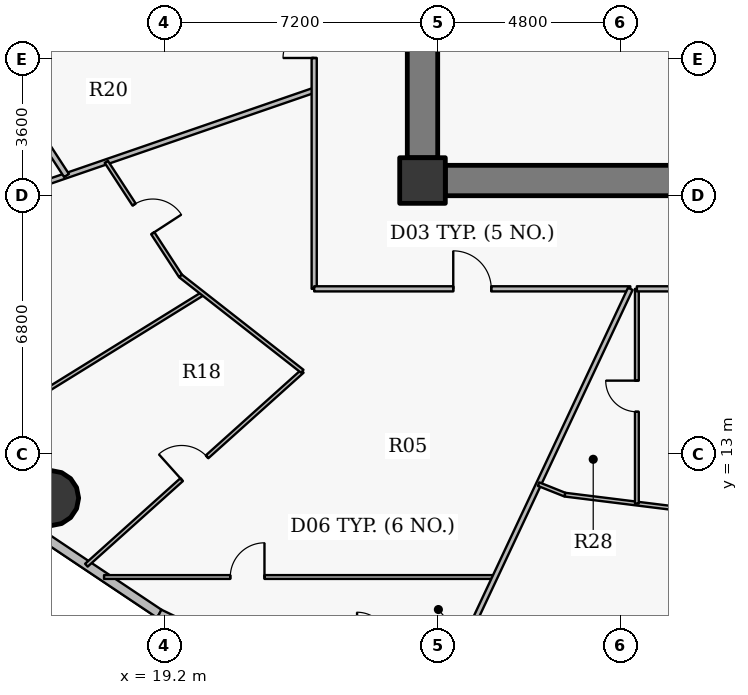
"""IFC4 building model, lengths in metres.
Left out: names, types, materials, properties, quantities, classifications, styles, units other than length and angle.
Written with IfcOpenShell. Run it as: python <this file> out.ifc"""

import sys

from ifc_helpers import new_model, si_unit, direction, frame, frame_2d, origin, origin_2d, place, context, subcontext, project, spatial, rectangle, hollow_circle, extrude, source, transform, mapped, element, fill, save


model = new_model("IFC4")
c1 = context("Model", 3, precision=1e-05, world=origin(), true_north=direction((0.0, 1.0)))
c2 = subcontext(c1, "Body", "Model", "MODEL_VIEW")
j1 = project(units=[si_unit("LENGTHUNIT", "METRE"), si_unit("PLANEANGLEUNIT", "RADIAN")], contexts=[c1])
p1 = place(None, origin())
s1 = spatial("IfcSite", under=j1, at=p1, CompositionType="ELEMENT")
p2 = place(p1, origin())
s2 = spatial("IfcBuilding", under=s1, at=p2, CompositionType="ELEMENT")
p3 = place(p2, frame((0.0, 0.0, 142.2)))
s3 = spatial("IfcBuildingStorey", under=s2, at=p3, CompositionType="ELEMENT", Elevation=142.2)
p4 = place(p3, frame((26.0, 20.2, 0.0), z_axis=(0.0, 0.0, 1.0), x_axis=(1.0, 0.0, 0.0)))
e1 = element("IfcColumn", 1, at=p4, inside=s3, PredefinedType="COLUMN", context=c2, shape_type="SweptSolid", body=[
    extrude(rectangle(XDim=1.2, YDim=1.2, at=origin_2d()), origin(), (0.0, 0.0, 1.0), 3.75),
])
p5 = place(p3, frame((45.4, 20.2, 0.0), z_axis=(0.0, 0.0, 1.0), x_axis=(-1.0, 0.0, 0.0)))
e2 = element("IfcWall", 2, at=p5, inside=s3, PredefinedType="SHEAR", context=c2, shape_type="SweptSolid", body=[
    extrude(rectangle(XDim=18.8, YDim=0.8, at=frame_2d((9.4, 0.0))), origin(), (0.0, 0.0, 1.0), 2.9),
])
p6 = place(p5, frame((10.15, 0.0, 0.0)))
e3 = element("IfcOpeningElement", 3, at=p6, cuts=e2, PredefinedType="OPENING", context=c2, shape_type="SweptSolid", body=[
    extrude(rectangle(XDim=1.15, YDim=2.15, at=origin_2d()), frame((0.575, 0.41, 1.075), z_axis=(0.0, -1.0, 0.0), x_axis=(1.0, 0.0, 0.0)), (0.0, 0.0, 1.0), 0.82),
])
p7 = place(p3, frame((26.0, 20.8, 0.0), z_axis=(0.0, 0.0, 1.0), x_axis=(0.0, 1.0, 0.0)))
e4 = element("IfcWall", 4, at=p7, inside=s3, PredefinedType="SHEAR", context=c2, shape_type="SweptSolid", body=[
    extrude(rectangle(XDim=12.4, YDim=0.8, at=frame_2d((6.2, 0.0))), origin(), (0.0, 0.0, 1.0), 2.9),
])
p8 = place(p7, frame((5.79, 0.0, 0.0)))
e5 = element("IfcOpeningElement", 5, at=p8, cuts=e4, PredefinedType="OPENING", context=c2, shape_type="SweptSolid", body=[
    extrude(rectangle(XDim=0.82, YDim=2.1, at=origin_2d()), frame((0.41, 0.41, 1.05), z_axis=(0.0, -1.0, 0.0), x_axis=(1.0, 0.0, 0.0)), (0.0, 0.0, 1.0), 0.82),
])
p9 = place(p3, frame((16.227, 11.844, 0.0), z_axis=(0.0, 0.0, 1.0), x_axis=(1.0, 0.0, 0.0)))
e6 = element("IfcColumn", 6, at=p9, inside=s3, PredefinedType="COLUMN", context=c2, shape_type="SweptSolid", body=[
    extrude(hollow_circle(Radius=0.725, WallThickness=0.042, at=origin_2d()), origin(), (0.0, 0.0, 1.0), 3.75),
])
p10 = place(p3, frame((19.075, 8.801, 0.0), z_axis=(0.0, 0.0, 1.0), x_axis=(-0.831221811447, 0.555940914284, 0.0)))
e7 = element("IfcWall", 7, at=p10, inside=s3, PredefinedType="SOLIDWALL", context=c2, shape_type="SweptSolid", body=[
    extrude(rectangle(XDim=4.13, YDim=0.24, at=frame_2d((2.065, 0.0))), origin(), (0.0, 0.0, 1.0), 3.45),
])
p11 = place(p3, frame((22.926, 6.953, 0.0), z_axis=(0.0, 0.0, 1.0), x_axis=(-0.901589935876, 0.432591709962, 0.0)))
e8 = element("IfcWall", 8, at=p11, inside=s3, PredefinedType="SOLIDWALL", context=c2, shape_type="SweptSolid", body=[
    extrude(rectangle(XDim=4.272, YDim=0.24, at=frame_2d((2.136, 0.0))), origin(), (0.0, 0.0, 1.0), 3.45),
])
p12 = place(p3, frame((7.779, 22.812, 0.0), z_axis=(0.0, 0.0, 1.0), x_axis=(0.989169524168, 0.146777561148, 0.0)))
e9 = element("IfcWall", 9, at=p12, inside=s3, PredefinedType="PARTITIONING", context=c2, shape_type="SweptSolid", body=[
    extrude(rectangle(XDim=15.539, YDim=0.15, at=frame_2d((7.77, 0.0))), origin(), (0.0, 0.0, 1.0), 2.885),
])
p13 = place(p12, frame((3.265, 0.0, 0.0)))
e10 = element("IfcOpeningElement", 10, at=p13, cuts=e9, PredefinedType="OPENING", context=c2, shape_type="SweptSolid", body=[
    extrude(rectangle(XDim=1.05, YDim=2.15, at=origin_2d()), frame((0.525, 0.085, 1.075), z_axis=(0.0, -1.0, 0.0), x_axis=(1.0, 0.0, 0.0)), (0.0, 0.0, 1.0), 0.17),
])
p14 = place(p3, frame((9.735, 17.956, 0.0), z_axis=(0.0, 0.0, 1.0), x_axis=(0.945515704768, 0.325576491836, 0.0)))
e11 = element("IfcWall", 11, at=p14, inside=s3, PredefinedType="PARTITIONING", context=c2, shape_type="SweptSolid", body=[
    extrude(rectangle(XDim=14.188, YDim=0.135, at=frame_2d((7.094, 0.0))), origin(), (0.0, 0.0, 1.0), 2.885),
])
p15 = place(p3, frame((13.494, 13.059, 0.0), z_axis=(0.0, 0.0, 1.0), x_axis=(0.850110644983, 0.526604112486, 0.0)))
e12 = element("IfcWall", 12, at=p15, inside=s3, PredefinedType="PARTITIONING", context=c2, shape_type="SweptSolid", body=[
    extrude(rectangle(XDim=7.916, YDim=0.1, at=frame_2d((3.958, 0.0))), origin(), (0.0, 0.0, 1.0), 2.885),
])
p16 = place(p3, frame((15.661, 21.825, 0.0), z_axis=(0.0, 0.0, 1.0), x_axis=(0.54543603077, -0.838152454114, 0.0)))
e13 = element("IfcWall", 13, at=p16, inside=s3, PredefinedType="PARTITIONING", context=c2, shape_type="SweptSolid", body=[
    extrude(rectangle(XDim=1.782, YDim=0.15, at=frame_2d((0.891, 0.0))), origin(), (0.0, 0.0, 1.0), 2.885),
])
p17 = place(p3, frame((17.155, 10.078, 0.0), z_axis=(0.0, 0.0, 1.0), x_axis=(0.744051955022, 0.668121761528, 0.0)))
e14 = element("IfcWall", 14, at=p17, inside=s3, PredefinedType="PARTITIONING", context=c2, shape_type="SweptSolid", body=[
    extrude(rectangle(XDim=7.636, YDim=0.1, at=frame_2d((3.818, 0.0))), origin(), (0.0, 0.0, 1.0), 2.885),
])
p18 = place(p17, frame((3.368, 0.0, 0.0)))
e15 = element("IfcOpeningElement", 15, at=p18, cuts=e14, PredefinedType="OPENING", context=c2, shape_type="SweptSolid", body=[
    extrude(rectangle(XDim=0.9, YDim=2.1, at=origin_2d()), frame((0.45, 0.06, 1.05), z_axis=(0.0, -1.0, 0.0), x_axis=(1.0, 0.0, 0.0)), (0.0, 0.0, 1.0), 0.12),
])
p19 = place(p3, frame((17.62, 9.768, 0.0), z_axis=(0.0, 0.0, 1.0), x_axis=(1.0, 0.0, 0.0)))
e16 = element("IfcWall", 16, at=p19, inside=s3, PredefinedType="PARTITIONING", context=c2, shape_type="SweptSolid", body=[
    extrude(rectangle(XDim=10.288, YDim=0.1, at=frame_2d((5.144, 0.0))), origin(), (0.0, 0.0, 1.0), 2.885),
])
p20 = place(p19, frame((3.322, 0.0, 0.0)))
e17 = element("IfcOpeningElement", 17, at=p20, cuts=e16, PredefinedType="OPENING", context=c2, shape_type="SweptSolid", body=[
    extrude(rectangle(XDim=0.9, YDim=2.1, at=origin_2d()), frame((0.45, 0.06, 1.05), z_axis=(0.0, -1.0, 0.0), x_axis=(1.0, 0.0, 0.0)), (0.0, 0.0, 1.0), 0.12),
])
p21 = place(p3, frame((17.68, 20.692, 0.0), z_axis=(0.0, 0.0, 1.0), x_axis=(0.545371539428, -0.838194418964, 0.0)))
e18 = element("IfcWall", 18, at=p21, inside=s3, PredefinedType="PARTITIONING", context=c2, shape_type="SweptSolid", body=[
    extrude(rectangle(XDim=3.583, YDim=0.1, at=frame_2d((1.791, 0.0))), origin(), (0.0, 0.0, 1.0), 3.45),
])
p22 = place(p21, frame((1.341, 0.0, 0.0)))
e19 = element("IfcOpeningElement", 19, at=p22, cuts=e18, PredefinedType="OPENING", context=c2, shape_type="SweptSolid", body=[
    extrude(rectangle(XDim=0.9, YDim=2.1, at=origin_2d()), frame((0.45, 0.06, 1.05), z_axis=(0.0, -1.0, 0.0), x_axis=(1.0, 0.0, 0.0)), (0.0, 0.0, 1.0), 0.12),
])
p23 = place(p3, frame((19.634, 17.689, 0.0), z_axis=(0.0, 0.0, 1.0), x_axis=(0.787341639438, -0.616516944461, 0.0)))
e20 = element("IfcWall", 20, at=p23, inside=s3, PredefinedType="PARTITIONING", context=c2, shape_type="SweptSolid", body=[
    extrude(rectangle(XDim=4.069, YDim=0.1, at=frame_2d((2.034, 0.0))), origin(), (0.0, 0.0, 1.0), 2.885),
])
p24 = place(p3, frame((23.15, 17.35, 0.0), z_axis=(0.0, 0.0, 1.0), x_axis=(0.0, 1.0, 0.0)))
e21 = element("IfcWall", 21, at=p24, inside=s3, PredefinedType="PARTITIONING", context=c2, shape_type="SweptSolid", body=[
    extrude(rectangle(XDim=19.3, YDim=0.135, at=frame_2d((9.65, 0.0))), origin(), (0.0, 0.0, 1.0), 2.885),
])
p25 = place(p24, frame((11.733, 0.0, 0.0)))
e22 = element("IfcOpeningElement", 22, at=p25, cuts=e21, PredefinedType="OPENING", context=c2, shape_type="SweptSolid", body=[
    extrude(rectangle(XDim=1.05, YDim=2.15, at=origin_2d()), frame((0.525, 0.078, 1.075), z_axis=(0.0, -1.0, 0.0), x_axis=(1.0, 0.0, 0.0)), (0.0, 0.0, 1.0), 0.155),
])
p26 = place(p24, frame((6.074, 0.0, 0.0)))
e23 = element("IfcOpeningElement", 23, at=p26, cuts=e21, PredefinedType="OPENING", context=c2, shape_type="SweptSolid", body=[
    extrude(rectangle(XDim=0.82, YDim=2.1, at=origin_2d()), frame((0.41, 0.078, 1.05), z_axis=(0.0, -1.0, 0.0), x_axis=(1.0, 0.0, 0.0)), (0.0, 0.0, 1.0), 0.155),
])
p27 = place(p3, frame((23.15, 17.35, 0.0), z_axis=(0.0, 0.0, 1.0), x_axis=(1.0, 0.0, 0.0)))
e24 = element("IfcWall", 24, at=p27, inside=s3, PredefinedType="PARTITIONING", context=c2, shape_type="SweptSolid", body=[
    extrude(rectangle(XDim=8.318, YDim=0.135, at=frame_2d((4.159, 0.0))), origin(), (0.0, 0.0, 1.0), 2.885),
])
p28 = place(p27, frame((3.659, 0.0, 0.0)))
e25 = element("IfcOpeningElement", 25, at=p28, cuts=e24, PredefinedType="OPENING", context=c2, shape_type="SweptSolid", body=[
    extrude(rectangle(XDim=1.0, YDim=2.15, at=origin_2d()), frame((0.5, 0.078, 1.075), z_axis=(0.0, -1.0, 0.0), x_axis=(1.0, 0.0, 0.0)), (0.0, 0.0, 1.0), 0.155),
])
p29 = place(p3, frame((26.1, 5.918, 0.0), z_axis=(0.0, 0.0, 1.0), x_axis=(0.425072644526, 0.905159238408, 0.0)))
e26 = element("IfcWall", 26, at=p29, inside=s3, PredefinedType="PARTITIONING", context=c2, shape_type="SweptSolid", body=[
    extrude(rectangle(XDim=12.63, YDim=0.135, at=frame_2d((6.315, 0.0))), origin(), (0.0, 0.0, 1.0), 2.885),
])
p30 = place(p3, frame((29.055, 12.211, 0.0), z_axis=(0.0, 0.0, 1.0), x_axis=(0.928859514795, -0.370432182423, 0.0)))
e27 = element("IfcWall", 27, at=p30, inside=s3, PredefinedType="PARTITIONING", context=c2, shape_type="SweptSolid", body=[
    extrude(rectangle(XDim=0.747, YDim=0.1, at=frame_2d((0.374, 0.0))), origin(), (0.0, 0.0, 1.0), 3.45),
])
p31 = place(p3, frame((29.749, 11.934, 0.0), z_axis=(0.0, 0.0, 1.0), x_axis=(0.992395485088, -0.123090215599, 0.0)))
e28 = element("IfcWall", 28, at=p31, inside=s3, PredefinedType="PARTITIONING", context=c2, shape_type="SweptSolid", body=[
    extrude(rectangle(XDim=6.299, YDim=0.1, at=frame_2d((3.15, 0.0))), origin(), (0.0, 0.0, 1.0), 2.885),
])
p32 = place(p31, frame((2.905, 0.0, 0.0)))
e29 = element("IfcOpeningElement", 29, at=p32, cuts=e28, PredefinedType="OPENING", context=c2, shape_type="SweptSolid", body=[
    extrude(rectangle(XDim=0.9, YDim=2.1, at=origin_2d()), frame((0.45, 0.06, 1.05), z_axis=(0.0, -1.0, 0.0), x_axis=(1.0, 0.0, 0.0)), (0.0, 0.0, 1.0), 0.12),
])
p33 = place(p3, frame((31.641, 11.7, 0.0), z_axis=(0.0, 0.0, 1.0), x_axis=(0.0, 1.0, 0.0)))
e30 = element("IfcWall", 30, at=p33, inside=s3, PredefinedType="PARTITIONING", context=c2, shape_type="SweptSolid", body=[
    extrude(rectangle(XDim=5.65, YDim=0.1, at=frame_2d((2.825, 0.0))), origin(), (0.0, 0.0, 1.0), 3.45),
])
p34 = place(p33, frame((2.415, 0.0, 0.0)))
e31 = element("IfcOpeningElement", 31, at=p34, cuts=e30, PredefinedType="OPENING", context=c2, shape_type="SweptSolid", body=[
    extrude(rectangle(XDim=0.82, YDim=2.1, at=origin_2d()), frame((0.41, 0.06, 1.05), z_axis=(0.0, -1.0, 0.0), x_axis=(1.0, 0.0, 0.0)), (0.0, 0.0, 1.0), 0.12),
])
p35 = place(p3, frame((31.641, 17.35, 0.0), z_axis=(0.0, 0.0, 1.0), x_axis=(1.0, 0.0, 0.0)))
e32 = element("IfcWall", 32, at=p35, inside=s3, PredefinedType="PARTITIONING", context=c2, shape_type="SweptSolid", body=[
    extrude(rectangle(XDim=1.882, YDim=0.135, at=frame_2d((0.941, 0.0))), origin(), (0.0, 0.0, 1.0), 3.45),
])
p36 = place(p3, frame((25.6, 20.79, 0.0), z_axis=(0.0, 0.0, 1.0), x_axis=(0.0, -1.0, 0.0)))
e33 = element("IfcWall", 33, at=p36, inside=s3, PredefinedType="PARTITIONING", context=c2, shape_type="SweptSolid", body=[
    extrude(rectangle(XDim=0.99, YDim=0.135, at=frame_2d((0.495, 0.0))), origin(), (0.0, 0.0, 1.0), 3.45),
])
p37 = place(p3, frame((25.907, 19.8, 0.0), z_axis=(0.0, 0.0, 1.0), x_axis=(1.0, 0.0, 0.0)))
e34 = element("IfcWall", 34, at=p37, inside=s3, PredefinedType="PARTITIONING", context=c2, shape_type="SweptSolid", body=[
    extrude(rectangle(XDim=0.683, YDim=0.135, at=frame_2d((0.341, 0.0))), origin(), (0.0, 0.0, 1.0), 2.885),
])
m1 = source(origin(), c2, "Body", "SweptSolid", [
    extrude(rectangle(XDim=1.0, YDim=2.15, at=origin_2d()), frame((0.5, 0.025, 1.075), z_axis=(0.0, -1.0, 0.0), x_axis=(1.0, 0.0, 0.0)), (0.0, 0.0, 1.0), 0.05),
])
p38 = place(p28, origin())
e35 = element("IfcDoor", 35, at=p38, inside=s3, OperationType="SINGLE_SWING_LEFT", PredefinedType="DOOR", context=c2, shape_type="MappedRepresentation", body=[
    mapped(m1, transform((0.0, 0.0, 0.0), x_axis=(1.0, 0.0, 0.0), y_axis=(0.0, 1.0, 0.0), z_axis=(0.0, 0.0, 1.0), scale=1.0)),
])
fill(e25, e35)
m2 = source(origin(), c2, "Body", "SweptSolid", [
    extrude(rectangle(XDim=0.9, YDim=2.1, at=origin_2d()), frame((0.45, 0.025, 1.05), z_axis=(0.0, -1.0, 0.0), x_axis=(1.0, 0.0, 0.0)), (0.0, 0.0, 1.0), 0.05),
])
p39 = place(p22, origin())
e36 = element("IfcDoor", 36, at=p39, inside=s3, OperationType="SINGLE_SWING_RIGHT", PredefinedType="DOOR", context=c2, shape_type="MappedRepresentation", body=[
    mapped(m2, transform((0.0, 0.0, 0.0), x_axis=(1.0, 0.0, 0.0), y_axis=(0.0, 1.0, 0.0), z_axis=(0.0, 0.0, 1.0), scale=1.0)),
])
fill(e19, e36)
p40 = place(p18, origin())
e37 = element("IfcDoor", 37, at=p40, inside=s3, OperationType="SINGLE_SWING_LEFT", PredefinedType="DOOR", context=c2, shape_type="MappedRepresentation", body=[
    mapped(m2, transform((0.0, 0.0, 0.0), x_axis=(1.0, 0.0, 0.0), y_axis=(0.0, 1.0, 0.0), z_axis=(0.0, 0.0, 1.0), scale=1.0)),
])
fill(e15, e37)
p41 = place(p20, origin())
e38 = element("IfcDoor", 38, at=p41, inside=s3, OperationType="SINGLE_SWING_RIGHT", PredefinedType="DOOR", context=c2, shape_type="MappedRepresentation", body=[
    mapped(m2, transform((0.0, 0.0, 0.0), x_axis=(1.0, 0.0, 0.0), y_axis=(0.0, 1.0, 0.0), z_axis=(0.0, 0.0, 1.0), scale=1.0)),
])
fill(e17, e38)
m3 = source(origin(), c2, "Body", "SweptSolid", [
    extrude(rectangle(XDim=0.82, YDim=2.1, at=origin_2d()), frame((0.41, 0.025, 1.05), z_axis=(0.0, -1.0, 0.0), x_axis=(1.0, 0.0, 0.0)), (0.0, 0.0, 1.0), 0.05),
])
p42 = place(p34, origin())
e39 = element("IfcDoor", 39, at=p42, inside=s3, OperationType="SINGLE_SWING_RIGHT", PredefinedType="DOOR", context=c2, shape_type="MappedRepresentation", body=[
    mapped(m3, transform((0.0, 0.0, 0.0), x_axis=(1.0, 0.0, 0.0), y_axis=(0.0, 1.0, 0.0), z_axis=(0.0, 0.0, 1.0), scale=1.0)),
])
fill(e31, e39)
p43 = place(p26, origin())
e40 = element("IfcDoor", 40, at=p43, inside=s3, OperationType="SINGLE_SWING_LEFT", PredefinedType="DOOR", context=c2, shape_type="MappedRepresentation", body=[
    mapped(m3, transform((0.0, 0.0, 0.0), x_axis=(1.0, 0.0, 0.0), y_axis=(0.0, 1.0, 0.0), z_axis=(0.0, 0.0, 1.0), scale=1.0)),
])
fill(e23, e40)
save(model, sys.argv[1])
